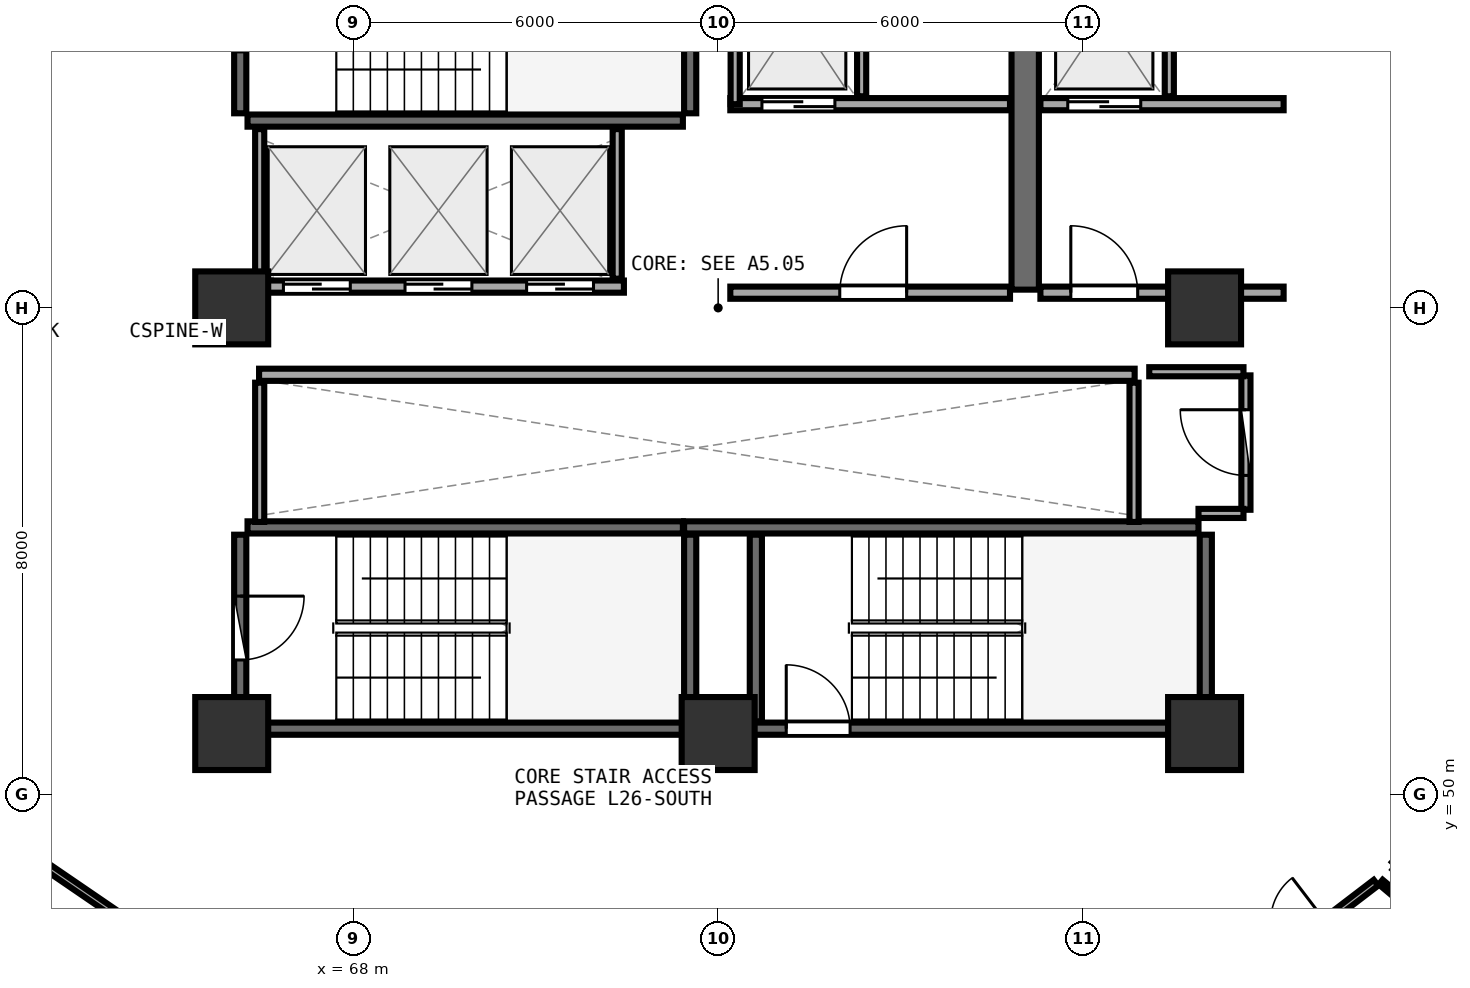
"""IFC4 building model, lengths in metres.
Left out: names, types, materials, properties, quantities, classifications, styles, units other than length and angle.
Written with IfcOpenShell. Run it as: python <this file> out.ifc"""

import sys

from ifc_helpers import new_model, si_unit, direction, frame, frame_2d, origin, origin_2d, place, context, subcontext, project, spatial, rectangle, extrude, element, fill, save


model = new_model("IFC4")
c1 = context("Model", 3, precision=1e-05, world=origin(), true_north=direction((0.0, 1.0)))
c2 = subcontext(c1, "Body", "Model", "MODEL_VIEW")
j1 = project(units=[si_unit("LENGTHUNIT", "METRE"), si_unit("PLANEANGLEUNIT", "RADIAN")], contexts=[c1])
p1 = place(None, origin())
s1 = spatial("IfcSite", under=j1, at=p1, CompositionType="ELEMENT")
p2 = place(p1, origin())
s2 = spatial("IfcBuilding", under=s1, at=p2, CompositionType="ELEMENT")
p3 = place(p2, frame((0.0, 0.0, 102.6)))
s3 = spatial("IfcBuildingStorey", under=s2, at=p3, CompositionType="ELEMENT", Elevation=102.6)
for number, where, z_axis, x_axis in (
    (1, (66.0, 51.0, 0.0), (0.0, 0.0, 1.0), (1.0, 0.0, 0.0)),
    (2, (74.0, 51.0, 0.0), (0.0, 0.0, 1.0), (1.0, 0.0, 0.0)),
    (3, (82.0, 51.0, 0.0), (0.0, 0.0, 1.0), (1.0, 0.0, 0.0)),
    (4, (82.0, 58.0, 0.0), (0.0, 0.0, 1.0), (1.0, 0.0, 0.0)),
    (5, (66.0, 58.0, 0.0), (0.0, 0.0, 1.0), (1.0, 0.0, 0.0)),
):
    element("IfcColumn", number, at=place(p3, frame(where, z_axis=z_axis, x_axis=x_axis)), inside=s3, PredefinedType="PILASTER", context=c2, shape_type="SweptSolid", body=[
        extrude(rectangle(XDim=1.2, YDim=1.2, at=origin_2d()), origin(), (0.0, 0.0, 1.0), 3.75),
    ])
p4 = place(p3, frame((66.26, 61.08, 0.0), z_axis=(0.0, 0.0, 1.0), x_axis=(1.0, 0.0, 0.0)))
e6 = element("IfcWall", 6, at=p4, inside=s3, PredefinedType="SHEAR", context=c2, shape_type="SweptSolid", body=[
    extrude(rectangle(XDim=7.16, YDim=0.2, at=frame_2d((3.58, 0.0))), origin(), (0.0, 0.0, 1.0), 3.49),
])
p5 = place(p3, frame((73.54, 61.2, 0.0), z_axis=(0.0, 0.0, 1.0), x_axis=(0.0, 1.0, 0.0)))
e7 = element("IfcWall", 7, at=p5, inside=s3, PredefinedType="SHEAR", context=c2, shape_type="SweptSolid", body=[
    extrude(rectangle(XDim=3.07, YDim=0.2, at=frame_2d((1.535, 0.0))), origin(), (0.0, 0.0, 1.0), 3.49),
])
p6 = place(p3, frame((66.14, 64.27, 0.0), z_axis=(0.0, 0.0, 1.0), x_axis=(0.0, -1.0, 0.0)))
e8 = element("IfcWall", 8, at=p6, inside=s3, PredefinedType="SHEAR", context=c2, shape_type="SweptSolid", body=[
    extrude(rectangle(XDim=3.07, YDim=0.2, at=frame_2d((1.535, 0.0))), origin(), (0.0, 0.0, 1.0), 3.49),
])
p7 = place(p6, frame((1.01, 0.0, 0.0)))
e9 = element("IfcOpeningElement", 9, at=p7, cuts=e8, PredefinedType="OPENING", context=c2, shape_type="SweptSolid", body=[
    extrude(rectangle(XDim=1.05, YDim=2.1, at=frame_2d((0.525, 1.05))), frame((0.0, 0.11, 0.0), z_axis=(0.0, -1.0, 0.0), x_axis=(1.0, 0.0, 0.0)), (0.0, 0.0, 1.0), 0.22),
])
p8 = place(p3, frame((74.0, 51.08, 0.0), z_axis=(0.0, 0.0, 1.0), x_axis=(1.0, 0.0, 0.0)))
e10 = element("IfcWall", 10, at=p8, inside=s3, PredefinedType="SHEAR", context=c2, shape_type="SweptSolid", body=[
    extrude(rectangle(XDim=7.9, YDim=0.2, at=frame_2d((3.95, 0.0))), origin(), (0.0, 0.0, 1.0), 3.49),
])
p9 = place(p8, frame((1.12, 0.0, 0.0)))
e11 = element("IfcOpeningElement", 11, at=p9, cuts=e10, PredefinedType="OPENING", context=c2, shape_type="SweptSolid", body=[
    extrude(rectangle(XDim=1.05, YDim=2.1, at=frame_2d((0.525, 1.05))), frame((0.0, 0.11, 0.0), z_axis=(0.0, -1.0, 0.0), x_axis=(1.0, 0.0, 0.0)), (0.0, 0.0, 1.0), 0.22),
])
p10 = place(p3, frame((82.02, 51.2, 0.0), z_axis=(0.0, 0.0, 1.0), x_axis=(0.0, 1.0, 0.0)))
e12 = element("IfcWall", 12, at=p10, inside=s3, PredefinedType="SHEAR", context=c2, shape_type="SweptSolid", body=[
    extrude(rectangle(XDim=3.07, YDim=0.2, at=frame_2d((1.535, 0.0))), origin(), (0.0, 0.0, 1.0), 3.49),
])
p11 = place(p3, frame((81.9, 54.39, 0.0), z_axis=(0.0, 0.0, 1.0), x_axis=(-1.0, 0.0, 0.0)))
e13 = element("IfcWall", 13, at=p11, inside=s3, PredefinedType="SHEAR", context=c2, shape_type="SweptSolid", body=[
    extrude(rectangle(XDim=8.46, YDim=0.2, at=frame_2d((4.23, 0.0))), origin(), (0.0, 0.0, 1.0), 3.49),
])
p12 = place(p3, frame((74.62, 54.27, 0.0), z_axis=(0.0, 0.0, 1.0), x_axis=(0.0, -1.0, 0.0)))
e14 = element("IfcWall", 14, at=p12, inside=s3, PredefinedType="SHEAR", context=c2, shape_type="SweptSolid", body=[
    extrude(rectangle(XDim=3.07, YDim=0.2, at=frame_2d((1.535, 0.0))), origin(), (0.0, 0.0, 1.0), 3.49),
])
p13 = place(p3, frame((66.26, 51.08, 0.0), z_axis=(0.0, 0.0, 1.0), x_axis=(1.0, 0.0, 0.0)))
e15 = element("IfcWall", 15, at=p13, inside=s3, PredefinedType="SHEAR", context=c2, shape_type="SweptSolid", body=[
    extrude(rectangle(XDim=7.16, YDim=0.2, at=frame_2d((3.58, 0.0))), origin(), (0.0, 0.0, 1.0), 3.49),
])
p14 = place(p3, frame((73.54, 51.2, 0.0), z_axis=(0.0, 0.0, 1.0), x_axis=(0.0, 1.0, 0.0)))
e16 = element("IfcWall", 16, at=p14, inside=s3, PredefinedType="SHEAR", context=c2, shape_type="SweptSolid", body=[
    extrude(rectangle(XDim=3.07, YDim=0.2, at=frame_2d((1.535, 0.0))), origin(), (0.0, 0.0, 1.0), 3.49),
])
p15 = place(p3, frame((73.42, 54.39, 0.0), z_axis=(0.0, 0.0, 1.0), x_axis=(-1.0, 0.0, 0.0)))
e17 = element("IfcWall", 17, at=p15, inside=s3, PredefinedType="SHEAR", context=c2, shape_type="SweptSolid", body=[
    extrude(rectangle(XDim=7.16, YDim=0.2, at=frame_2d((3.58, 0.0))), origin(), (0.0, 0.0, 1.0), 3.49),
])
p16 = place(p3, frame((66.14, 54.27, 0.0), z_axis=(0.0, 0.0, 1.0), x_axis=(0.0, -1.0, 0.0)))
e18 = element("IfcWall", 18, at=p16, inside=s3, PredefinedType="SHEAR", context=c2, shape_type="SweptSolid", body=[
    extrude(rectangle(XDim=3.07, YDim=0.2, at=frame_2d((1.535, 0.0))), origin(), (0.0, 0.0, 1.0), 3.49),
])
p17 = place(p16, frame((1.01, 0.0, 0.0)))
e19 = element("IfcOpeningElement", 19, at=p17, cuts=e18, PredefinedType="OPENING", context=c2, shape_type="SweptSolid", body=[
    extrude(rectangle(XDim=1.05, YDim=2.1, at=frame_2d((0.525, 1.05))), frame((0.0, 0.11, 0.0), z_axis=(0.0, -1.0, 0.0), x_axis=(1.0, 0.0, 0.0)), (0.0, 0.0, 1.0), 0.22),
])
p18 = place(p3, frame((79.05, 58.3, 0.0), z_axis=(0.0, 0.0, 1.0), x_axis=(0.0, 1.0, 0.0)))
e20 = element("IfcWall", 20, at=p18, inside=s3, PredefinedType="SHEAR", context=c2, shape_type="SweptSolid", body=[
    extrude(rectangle(XDim=6.3, YDim=0.45, at=frame_2d((3.15, 0.0))), origin(), (0.0, 0.0, 1.0), 3.49),
])
p19 = place(p3, frame((74.2, 61.35, 0.0), z_axis=(0.0, 0.0, 1.0), x_axis=(1.0, 0.0, 0.0)))
e21 = element("IfcWall", 21, at=p19, inside=s3, PredefinedType="SOLIDWALL", context=c2, shape_type="SweptSolid", body=[
    extrude(rectangle(XDim=4.6, YDim=0.2, at=frame_2d((2.3, 0.0))), origin(), (0.0, 0.0, 1.0), 3.48),
])
p20 = place(p19, frame((0.52, 0.0, 0.0)))
e22 = element("IfcOpeningElement", 22, at=p20, cuts=e21, PredefinedType="OPENING", context=c2, shape_type="SweptSolid", body=[
    extrude(rectangle(XDim=1.2, YDim=2.15, at=frame_2d((0.6, 1.075))), frame((0.0, 0.11, 0.0), z_axis=(0.0, -1.0, 0.0), x_axis=(1.0, 0.0, 0.0)), (0.0, 0.0, 1.0), 0.22),
])
p21 = place(p3, frame((74.28, 61.35, 0.0), z_axis=(0.0, 0.0, 1.0), x_axis=(0.0, 1.0, 0.0)))
e23 = element("IfcWall", 23, at=p21, inside=s3, PredefinedType="PARTITIONING", context=c2, shape_type="SweptSolid", body=[
    extrude(rectangle(XDim=2.97, YDim=0.15, at=frame_2d((1.485, 0.0))), origin(), (0.0, 0.0, 1.0), 3.48),
])
p22 = place(p3, frame((76.36, 61.48, 0.0), z_axis=(0.0, 0.0, 1.0), x_axis=(0.0, 1.0, 0.0)))
e24 = element("IfcWall", 24, at=p22, inside=s3, PredefinedType="PARTITIONING", context=c2, shape_type="SweptSolid", body=[
    extrude(rectangle(XDim=2.84, YDim=0.15, at=frame_2d((1.42, 0.0))), origin(), (0.0, 0.0, 1.0), 3.48),
])
p23 = place(p3, frame((79.3, 61.35, 0.0), z_axis=(0.0, 0.0, 1.0), x_axis=(1.0, 0.0, 0.0)))
e25 = element("IfcWall", 25, at=p23, inside=s3, PredefinedType="SOLIDWALL", context=c2, shape_type="SweptSolid", body=[
    extrude(rectangle(XDim=4.0, YDim=0.2, at=frame_2d((2.0, 0.0))), origin(), (0.0, 0.0, 1.0), 2.775),
])
p24 = place(p23, frame((0.45, 0.0, 0.0)))
e26 = element("IfcOpeningElement", 26, at=p24, cuts=e25, PredefinedType="OPENING", context=c2, shape_type="SweptSolid", body=[
    extrude(rectangle(XDim=1.2, YDim=2.15, at=frame_2d((0.6, 1.075))), frame((0.0, 0.11, 0.0), z_axis=(0.0, -1.0, 0.0), x_axis=(1.0, 0.0, 0.0)), (0.0, 0.0, 1.0), 0.22),
])
p25 = place(p3, frame((81.42, 61.48, 0.0), z_axis=(0.0, 0.0, 1.0), x_axis=(0.0, 1.0, 0.0)))
e27 = element("IfcWall", 27, at=p25, inside=s3, PredefinedType="PARTITIONING", context=c2, shape_type="SweptSolid", body=[
    extrude(rectangle(XDim=2.84, YDim=0.15, at=frame_2d((1.42, 0.0))), origin(), (0.0, 0.0, 1.0), 3.48),
])
p26 = place(p3, frame((74.2, 58.25, 0.0), z_axis=(0.0, 0.0, 1.0), x_axis=(1.0, 0.0, 0.0)))
e28 = element("IfcWall", 28, at=p26, inside=s3, PredefinedType="SOLIDWALL", context=c2, shape_type="SweptSolid", body=[
    extrude(rectangle(XDim=4.6, YDim=0.2, at=frame_2d((2.3, 0.0))), origin(), (0.0, 0.0, 1.0), 3.48),
])
p27 = place(p26, frame((1.8, 0.0, 0.0)))
e29 = element("IfcOpeningElement", 29, at=p27, cuts=e28, PredefinedType="OPENING", context=c2, shape_type="SweptSolid", body=[
    extrude(rectangle(XDim=1.1, YDim=2.1, at=frame_2d((0.55, 1.05))), frame((0.0, 0.11, 0.0), z_axis=(0.0, -1.0, 0.0), x_axis=(1.0, 0.0, 0.0)), (0.0, 0.0, 1.0), 0.22),
])
p28 = place(p3, frame((79.3, 58.25, 0.0), z_axis=(0.0, 0.0, 1.0), x_axis=(1.0, 0.0, 0.0)))
e30 = element("IfcWall", 30, at=p28, inside=s3, PredefinedType="SOLIDWALL", context=c2, shape_type="SweptSolid", body=[
    extrude(rectangle(XDim=4.0, YDim=0.2, at=frame_2d((2.0, 0.0))), origin(), (0.0, 0.0, 1.0), 2.775),
])
p29 = place(p28, frame((0.5, 0.0, 0.0)))
e31 = element("IfcOpeningElement", 31, at=p29, cuts=e30, PredefinedType="OPENING", context=c2, shape_type="SweptSolid", body=[
    extrude(rectangle(XDim=1.1, YDim=2.1, at=frame_2d((0.55, 1.05))), frame((0.0, 0.11, 0.0), z_axis=(0.0, -1.0, 0.0), x_axis=(1.0, 0.0, 0.0)), (0.0, 0.0, 1.0), 0.22),
])
p30 = place(p3, frame((66.45, 58.35, 0.0), z_axis=(0.0, 0.0, 1.0), x_axis=(1.0, 0.0, 0.0)))
e32 = element("IfcWall", 32, at=p30, inside=s3, PredefinedType="SOLIDWALL", context=c2, shape_type="SweptSolid", body=[
    extrude(rectangle(XDim=6.0, YDim=0.2, at=frame_2d((3.0, 0.0))), origin(), (0.0, 0.0, 1.0), 3.48),
])
p31 = place(p30, frame((0.4, 0.0, 0.0)))
e33 = element("IfcOpeningElement", 33, at=p31, cuts=e32, PredefinedType="OPENING", context=c2, shape_type="SweptSolid", body=[
    extrude(rectangle(XDim=1.1, YDim=2.1, at=frame_2d((0.55, 1.05))), frame((0.0, 0.11, 0.0), z_axis=(0.0, -1.0, 0.0), x_axis=(1.0, 0.0, 0.0)), (0.0, 0.0, 1.0), 0.22),
])
p32 = place(p30, frame((2.4, 0.0, 0.0)))
e34 = element("IfcOpeningElement", 34, at=p32, cuts=e32, PredefinedType="OPENING", context=c2, shape_type="SweptSolid", body=[
    extrude(rectangle(XDim=1.1, YDim=2.1, at=frame_2d((0.55, 1.05))), frame((0.0, 0.11, 0.0), z_axis=(0.0, -1.0, 0.0), x_axis=(1.0, 0.0, 0.0)), (0.0, 0.0, 1.0), 0.22),
])
p33 = place(p30, frame((4.4, 0.0, 0.0)))
e35 = element("IfcOpeningElement", 35, at=p33, cuts=e32, PredefinedType="OPENING", context=c2, shape_type="SweptSolid", body=[
    extrude(rectangle(XDim=1.1, YDim=2.1, at=frame_2d((0.55, 1.05))), frame((0.0, 0.11, 0.0), z_axis=(0.0, -1.0, 0.0), x_axis=(1.0, 0.0, 0.0)), (0.0, 0.0, 1.0), 0.22),
])
for number, where, z_axis, x_axis in (
    (36, (66.46, 58.48, 0.0), (0.0, 0.0, 1.0), (0.0, 1.0, 0.0)),
    (37, (72.34, 58.48, 0.0), (0.0, 0.0, 1.0), (0.0, 1.0, 0.0)),
):
    element("IfcWall", number, at=place(p3, frame(where, z_axis=z_axis, x_axis=x_axis)), inside=s3, PredefinedType="PARTITIONING", context=c2, shape_type="SweptSolid", body=[
        extrude(rectangle(XDim=2.46, YDim=0.15, at=frame_2d((1.23, 0.0))), origin(), (0.0, 0.0, 1.0), 3.48),
    ])
p34 = place(p3, frame((66.45, 56.9, 0.0), z_axis=(0.0, 0.0, 1.0), x_axis=(1.0, 0.0, 0.0)))
e38 = element("IfcWall", 38, at=p34, inside=s3, PredefinedType="SOLIDWALL", context=c2, shape_type="SweptSolid", body=[
    extrude(rectangle(XDim=14.4, YDim=0.2, at=frame_2d((7.2, 0.0))), origin(), (0.0, 0.0, 1.0), 3.48),
])
for number, where, z_axis, x_axis in (
    (39, (66.46, 54.48, 0.0), (0.0, 0.0, 1.0), (0.0, 1.0, 0.0)),
    (40, (80.84, 54.48, 0.0), (0.0, 0.0, 1.0), (0.0, 1.0, 0.0)),
):
    element("IfcWall", number, at=place(p3, frame(where, z_axis=z_axis, x_axis=x_axis)), inside=s3, PredefinedType="PARTITIONING", context=c2, shape_type="SweptSolid", body=[
        extrude(rectangle(XDim=2.29, YDim=0.15, at=frame_2d((1.145, 0.0))), origin(), (0.0, 0.0, 1.0), 3.48),
    ])
p35 = place(p3, frame((82.68, 54.68, 0.0), z_axis=(0.0, 0.0, 1.0), x_axis=(0.0, 1.0, 0.0)))
e41 = element("IfcWall", 41, at=p35, inside=s3, PredefinedType="PARTITIONING", context=c2, shape_type="SweptSolid", body=[
    extrude(rectangle(XDim=2.21, YDim=0.15, at=frame_2d((1.105, 0.0))), origin(), (0.0, 0.0, 1.0), 3.48),
])
p36 = place(p35, frame((0.565, 0.0, 0.0)))
e42 = element("IfcOpeningElement", 42, at=p36, cuts=e41, PredefinedType="OPENING", context=c2, shape_type="SweptSolid", body=[
    extrude(rectangle(XDim=1.08, YDim=2.1, at=frame_2d((0.54, 1.05))), frame((0.0, 0.085, 0.0), z_axis=(0.0, -1.0, 0.0), x_axis=(1.0, 0.0, 0.0)), (0.0, 0.0, 1.0), 0.17),
])
p37 = place(p3, frame((62.827, 48.899, 0.0), z_axis=(0.0, 0.0, 1.0), x_axis=(0.825618475233, -0.564228795219, 0.0)))
e43 = element("IfcWall", 43, at=p37, inside=s3, PredefinedType="PARTITIONING", context=c2, shape_type="SweptSolid", body=[
    extrude(rectangle(XDim=5.578, YDim=0.12, at=frame_2d((2.789, 0.0))), origin(), (0.0, 0.0, 1.0), 2.925),
])
p38 = place(p37, frame((2.339, 0.0, 0.0)))
e44 = element("IfcOpeningElement", 44, at=p38, cuts=e43, PredefinedType="OPENING", context=c2, shape_type="SweptSolid", body=[
    extrude(rectangle(XDim=0.9, YDim=2.08, at=frame_2d((0.45, 1.04))), frame((0.0, 0.07, 0.0), z_axis=(0.0, -1.0, 0.0), x_axis=(1.0, 0.0, 0.0)), (0.0, 0.0, 1.0), 0.14),
])
p39 = place(p3, frame((82.44, 46.729, 0.0), z_axis=(0.0, 0.0, 1.0), x_axis=(0.794654066843, 0.607062528945, 0.0)))
e45 = element("IfcWall", 45, at=p39, inside=s3, PredefinedType="PARTITIONING", context=c2, shape_type="SweptSolid", body=[
    extrude(rectangle(XDim=2.993, YDim=0.12, at=frame_2d((1.497, 0.0))), origin(), (0.0, 0.0, 1.0), 2.925),
])
p40 = place(p39, frame((1.047, 0.0, 0.0)))
e46 = element("IfcOpeningElement", 46, at=p40, cuts=e45, PredefinedType="OPENING", context=c2, shape_type="SweptSolid", body=[
    extrude(rectangle(XDim=0.9, YDim=2.08, at=frame_2d((0.45, 1.04))), frame((0.0, 0.07, 0.0), z_axis=(0.0, -1.0, 0.0), x_axis=(1.0, 0.0, 0.0)), (0.0, 0.0, 1.0), 0.14),
])
p41 = place(p3, frame((81.9, 54.62, 0.0), z_axis=(0.0, 0.0, 1.0), x_axis=(1.0, 0.0, 0.0)))
e47 = element("IfcWall", 47, at=p41, inside=s3, PredefinedType="PARTITIONING", context=c2, shape_type="SweptSolid", body=[
    extrude(rectangle(XDim=0.74, YDim=0.15, at=frame_2d((0.37, 0.0))), origin(), (0.0, 0.0, 1.0), 2.775),
])
p42 = place(p3, frame((82.64, 56.95, 0.0), z_axis=(0.0, 0.0, 1.0), x_axis=(-1.0, 0.0, 0.0)))
e48 = element("IfcWall", 48, at=p42, inside=s3, PredefinedType="PARTITIONING", context=c2, shape_type="SweptSolid", body=[
    extrude(rectangle(XDim=1.55, YDim=0.15, at=frame_2d((0.775, 0.0))), origin(), (0.0, 0.0, 1.0), 2.775),
])
p43 = place(p3, frame((84.896, 48.557, 0.0), z_axis=(0.0, 0.0, 1.0), x_axis=(0.765171343651, -0.64382669629, 0.0)))
e49 = element("IfcWall", 49, at=p43, inside=s3, PredefinedType="PARTITIONING", context=c2, shape_type="SweptSolid", body=[
    extrude(rectangle(XDim=9.416, YDim=0.1, at=frame_2d((4.708, 0.0))), origin(), (0.0, 0.0, 1.0), 2.975),
])
p44 = place(p9, origin())
e50 = element("IfcDoor", 50, at=p44, inside=s3, OperationType="SINGLE_SWING_LEFT", PredefinedType="DOOR", context=c2, shape_type="SweptSolid", body=[
    extrude(rectangle(XDim=1.05, YDim=2.1, at=frame_2d((0.525, 1.05))), frame((0.0, 0.025, 0.0), z_axis=(0.0, -1.0, 0.0), x_axis=(1.0, 0.0, 0.0)), (0.0, 0.0, 1.0), 0.05),
])
fill(e11, e50)
p45 = place(p17, origin())
e51 = element("IfcDoor", 51, at=p45, inside=s3, OperationType="SINGLE_SWING_LEFT", PredefinedType="DOOR", context=c2, shape_type="SweptSolid", body=[
    extrude(rectangle(XDim=1.05, YDim=2.1, at=frame_2d((0.525, 1.05))), frame((0.0, 0.025, 0.0), z_axis=(0.0, -1.0, 0.0), x_axis=(1.0, 0.0, 0.0)), (0.0, 0.0, 1.0), 0.05),
])
fill(e19, e51)
p46 = place(p20, origin())
e52 = element("IfcDoor", 52, at=p46, inside=s3, OperationType="DOUBLE_DOOR_SLIDING", PredefinedType="DOOR", context=c2, shape_type="SweptSolid", body=[
    extrude(rectangle(XDim=1.2, YDim=2.15, at=frame_2d((0.6, 1.075))), frame((0.0, 0.025, 0.0), z_axis=(0.0, -1.0, 0.0), x_axis=(1.0, 0.0, 0.0)), (0.0, 0.0, 1.0), 0.05),
])
fill(e22, e52)
p47 = place(p24, origin())
e53 = element("IfcDoor", 53, at=p47, inside=s3, OperationType="DOUBLE_DOOR_SLIDING", PredefinedType="DOOR", context=c2, shape_type="SweptSolid", body=[
    extrude(rectangle(XDim=1.2, YDim=2.15, at=frame_2d((0.6, 1.075))), frame((0.0, 0.025, 0.0), z_axis=(0.0, -1.0, 0.0), x_axis=(1.0, 0.0, 0.0)), (0.0, 0.0, 1.0), 0.05),
])
fill(e26, e53)
p48 = place(p27, frame((1.1, 0.0, 0.0), z_axis=(0.0, 0.0, 1.0), x_axis=(-1.0, 0.0, 0.0)))
e54 = element("IfcDoor", 54, at=p48, inside=s3, OperationType="SINGLE_SWING_LEFT", PredefinedType="DOOR", context=c2, shape_type="SweptSolid", body=[
    extrude(rectangle(XDim=1.1, YDim=2.1, at=frame_2d((0.55, 1.05))), frame((0.0, 0.025, 0.0), z_axis=(0.0, -1.0, 0.0), x_axis=(1.0, 0.0, 0.0)), (0.0, 0.0, 1.0), 0.05),
])
fill(e29, e54)
p49 = place(p29, frame((1.1, 0.0, 0.0), z_axis=(0.0, 0.0, 1.0), x_axis=(-1.0, 0.0, 0.0)))
e55 = element("IfcDoor", 55, at=p49, inside=s3, OperationType="SINGLE_SWING_RIGHT", PredefinedType="DOOR", context=c2, shape_type="SweptSolid", body=[
    extrude(rectangle(XDim=1.1, YDim=2.1, at=frame_2d((0.55, 1.05))), frame((0.0, 0.025, 0.0), z_axis=(0.0, -1.0, 0.0), x_axis=(1.0, 0.0, 0.0)), (0.0, 0.0, 1.0), 0.05),
])
fill(e31, e55)
p50 = place(p31, origin())
e56 = element("IfcDoor", 56, at=p50, inside=s3, OperationType="DOUBLE_DOOR_SLIDING", PredefinedType="DOOR", context=c2, shape_type="SweptSolid", body=[
    extrude(rectangle(XDim=1.1, YDim=2.1, at=frame_2d((0.55, 1.05))), frame((0.0, 0.025, 0.0), z_axis=(0.0, -1.0, 0.0), x_axis=(1.0, 0.0, 0.0)), (0.0, 0.0, 1.0), 0.05),
])
fill(e33, e56)
p51 = place(p32, origin())
e57 = element("IfcDoor", 57, at=p51, inside=s3, OperationType="DOUBLE_DOOR_SLIDING", PredefinedType="DOOR", context=c2, shape_type="SweptSolid", body=[
    extrude(rectangle(XDim=1.1, YDim=2.1, at=frame_2d((0.55, 1.05))), frame((0.0, 0.025, 0.0), z_axis=(0.0, -1.0, 0.0), x_axis=(1.0, 0.0, 0.0)), (0.0, 0.0, 1.0), 0.05),
])
fill(e34, e57)
p52 = place(p33, origin())
e58 = element("IfcDoor", 58, at=p52, inside=s3, OperationType="DOUBLE_DOOR_SLIDING", PredefinedType="DOOR", context=c2, shape_type="SweptSolid", body=[
    extrude(rectangle(XDim=1.1, YDim=2.1, at=frame_2d((0.55, 1.05))), frame((0.0, 0.025, 0.0), z_axis=(0.0, -1.0, 0.0), x_axis=(1.0, 0.0, 0.0)), (0.0, 0.0, 1.0), 0.05),
])
fill(e35, e58)
p53 = place(p36, origin())
e59 = element("IfcDoor", 59, at=p53, inside=s3, OperationType="SINGLE_SWING_RIGHT", PredefinedType="DOOR", context=c2, shape_type="SweptSolid", body=[
    extrude(rectangle(XDim=1.08, YDim=2.1, at=frame_2d((0.54, 1.05))), frame((0.0, 0.025, 0.0), z_axis=(0.0, -1.0, 0.0), x_axis=(1.0, 0.0, 0.0)), (0.0, 0.0, 1.0), 0.05),
])
fill(e42, e59)
save(model, sys.argv[1])
